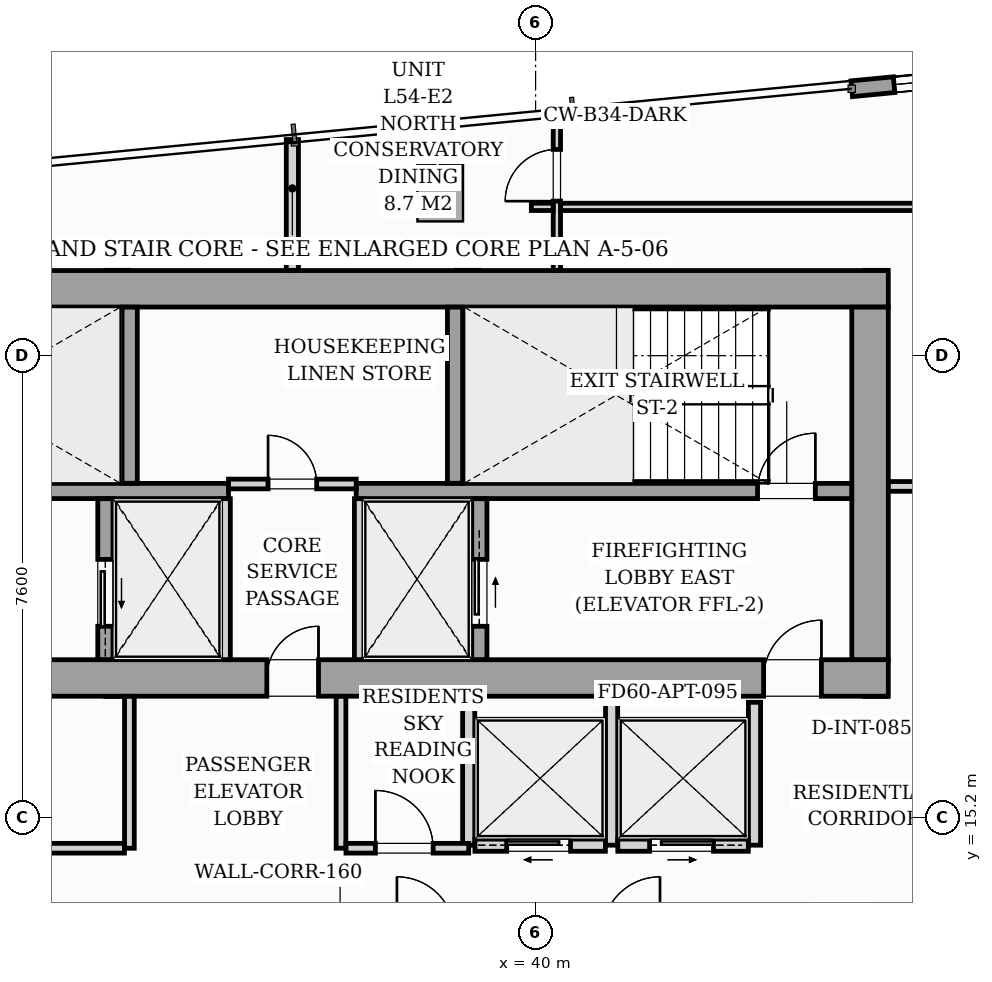
"""IFC4 building model, lengths in metres.
Left out: names, types, materials, properties, quantities, classifications, styles, units other than length and angle.
Written with IfcOpenShell. Run it as: python <this file> out.ifc"""

import sys

from ifc_helpers import new_model, si_unit, direction, frame, frame_2d, origin, origin_2d, place, context, subcontext, project, spatial, rectangle, i_section, extrude, source, transform, mapped, element, fill, save


model = new_model("IFC4")
c1 = context("Model", 3, precision=1e-05, world=origin(), true_north=direction((0.0, 1.0)))
c2 = subcontext(c1, "Body", "Model", "MODEL_VIEW")
j1 = project(units=[si_unit("LENGTHUNIT", "METRE"), si_unit("PLANEANGLEUNIT", "RADIAN")], contexts=[c1])
p1 = place(None, origin())
s1 = spatial("IfcSite", under=j1, at=p1, CompositionType="ELEMENT")
p2 = place(p1, origin())
s2 = spatial("IfcBuilding", under=s1, at=p2, CompositionType="ELEMENT")
p3 = place(p2, frame((0.0, 0.0, 189.0)))
s3 = spatial("IfcBuildingStorey", under=s2, at=p3, CompositionType="ELEMENT", Elevation=189.0)
m1 = source(origin(), c2, "Body", "SweptSolid", [
    extrude(i_section(OverallWidth=0.416, OverallDepth=0.446, WebThickness=0.039, FlangeThickness=0.063, FilletRadius=0.018, at=origin_2d()), origin(), (0.0, 0.0, 1.0), 3.196),
])
for number, where, z_axis, x_axis in (
    (1, (33.12, 17.4, 0.002), (0.0, 0.0, 1.0), (1.0, 0.0, 0.0)),
    (2, (38.88, 17.4, 0.002), (0.0, 0.0, 1.0), (1.0, 0.0, 0.0)),
    (3, (45.6, 17.4, 0.002), (0.0, 0.0, 1.0), (1.0, 0.0, 0.0)),
    (4, (33.12, 24.0, 0.002), (0.0, 0.0, 1.0), (1.0, 0.0, 0.0)),
    (5, (38.88, 24.0, 0.002), (0.0, 0.0, 1.0), (1.0, 0.0, 0.0)),
    (6, (45.6, 24.0, 0.002), (0.0, 0.0, 1.0), (1.0, 0.0, 0.0)),
):
    element("IfcColumn", number, at=place(p3, frame(where, z_axis=z_axis, x_axis=x_axis)), inside=s3, PredefinedType="PILASTER", context=c2, shape_type="MappedRepresentation", body=[
        mapped(m1, transform((0.0, 0.0, 0.0), scale=1.0)),
    ])
m2 = source(origin(), c2, "Body", "SweptSolid", [
    extrude(rectangle(XDim=0.75, YDim=0.95, at=origin_2d()), origin(), (0.0, 0.0, 1.0), 3.196),
])
p4 = place(p3, frame((38.431, 25.483, 0.002), z_axis=(0.0, 0.0, 1.0), x_axis=(0.995396198367, 0.09584575252, 0.0)))
e7 = element("IfcColumn", 7, at=p4, inside=s3, PredefinedType="COLUMN", context=c2, shape_type="MappedRepresentation", body=[
    mapped(m2, transform((0.0, 0.0, 0.0), scale=1.0)),
])
p5 = place(p3, frame((45.199, 27.19, 0.0), z_axis=(0.0, 0.0, 1.0), x_axis=(0.995397074604, 0.095836652014, 0.0)))
e8 = element("IfcWall", 8, at=p5, inside=s3, PredefinedType="STANDARD", context=c2, shape_type="SweptSolid", body=[
    extrude(rectangle(XDim=16.1, YDim=0.26, at=frame_2d((8.05, 0.0))), origin(), (0.0, 0.0, 1.0), 2.94),
])
p6 = place(p5, frame((8.4, 0.0, 0.0)))
e9 = element("IfcOpeningElement", 9, at=p6, cuts=e8, PredefinedType="OPENING", context=c2, shape_type="SweptSolid", body=[
    extrude(rectangle(XDim=1.8, YDim=2.06, at=frame_2d((0.9, 1.03))), frame((0.0, 0.14, 0.0), z_axis=(0.0, -1.0, 0.0), x_axis=(1.0, 0.0, 0.0)), (0.0, 0.0, 1.0), 0.28),
])
p7 = place(p5, frame((0.7, 0.0, 0.65)))
e10 = element("IfcOpeningElement", 10, at=p7, cuts=e8, PredefinedType="OPENING", context=c2, shape_type="SweptSolid", body=[
    extrude(rectangle(XDim=1.6, YDim=1.5, at=frame_2d((0.8, 0.75))), frame((0.0, 0.14, 0.0), z_axis=(0.0, -1.0, 0.0), x_axis=(1.0, 0.0, 0.0)), (0.0, 0.0, 1.0), 0.28),
])
p8 = place(p3, frame((26.2, 17.5, 0.0), z_axis=(0.0, 0.0, 1.0), x_axis=(1.0, 0.0, 0.0)))
e11 = element("IfcWall", 11, at=p8, inside=s3, PredefinedType="SHEAR", context=c2, shape_type="SweptSolid", body=[
    extrude(rectangle(XDim=19.6, YDim=0.6, at=frame_2d((9.8, 0.0))), origin(), (0.0, 0.0, 1.0), 3.2),
])
p9 = place(p8, frame((0.95, 0.0, 0.0)))
e12 = element("IfcOpeningElement", 12, at=p9, cuts=e11, PredefinedType="OPENING", context=c2, shape_type="SweptSolid", body=[
    extrude(rectangle(XDim=0.95, YDim=2.06, at=frame_2d((0.475, 1.03))), frame((0.0, 0.31, 0.0), z_axis=(0.0, -1.0, 0.0), x_axis=(1.0, 0.0, 0.0)), (0.0, 0.0, 1.0), 0.62),
])
p10 = place(p8, frame((9.38, 0.0, 0.0)))
e13 = element("IfcOpeningElement", 13, at=p10, cuts=e11, PredefinedType="OPENING", context=c2, shape_type="SweptSolid", body=[
    extrude(rectangle(XDim=0.85, YDim=2.0, at=frame_2d((0.425, 1.0))), frame((0.0, 0.31, 0.0), z_axis=(0.0, -1.0, 0.0), x_axis=(1.0, 0.0, 0.0)), (0.0, 0.0, 1.0), 0.62),
])
p11 = place(p8, frame((17.55, 0.0, 0.0)))
e14 = element("IfcOpeningElement", 14, at=p11, cuts=e11, PredefinedType="OPENING", context=c2, shape_type="SweptSolid", body=[
    extrude(rectangle(XDim=0.95, YDim=2.06, at=frame_2d((0.475, 1.03))), frame((0.0, 0.31, 0.0), z_axis=(0.0, -1.0, 0.0), x_axis=(1.0, 0.0, 0.0)), (0.0, 0.0, 1.0), 0.62),
])
p12 = place(p3, frame((26.2, 23.9, 0.0), z_axis=(0.0, 0.0, 1.0), x_axis=(1.0, 0.0, 0.0)))
e15 = element("IfcWall", 15, at=p12, inside=s3, PredefinedType="SHEAR", context=c2, shape_type="SweptSolid", body=[
    extrude(rectangle(XDim=19.6, YDim=0.6, at=frame_2d((9.8, 0.0))), origin(), (0.0, 0.0, 1.0), 3.2),
])
p13 = place(p3, frame((45.5, 17.802, 0.0), z_axis=(0.0, 0.0, 1.0), x_axis=(0.0, 1.0, 0.0)))
e16 = element("IfcWall", 16, at=p13, inside=s3, PredefinedType="SHEAR", context=c2, shape_type="SweptSolid", body=[
    extrude(rectangle(XDim=5.796, YDim=0.6, at=frame_2d((2.898, 0.0))), origin(), (0.0, 0.0, 1.0), 3.2),
])
p14 = place(p3, frame((26.802, 20.575, 0.0), z_axis=(0.0, 0.0, 1.0), x_axis=(1.0, 0.0, 0.0)))
e17 = element("IfcWall", 17, at=p14, inside=s3, PredefinedType="SOLIDWALL", context=c2, shape_type="SweptSolid", body=[
    extrude(rectangle(XDim=8.148, YDim=0.25, at=frame_2d((4.074, 0.0))), origin(), (0.0, 0.0, 1.0), 3.2),
])
p15 = place(p14, frame((0.298, 0.0, 0.0)))
e18 = element("IfcOpeningElement", 18, at=p15, cuts=e17, PredefinedType="OPENING", context=c2, shape_type="SweptSolid", body=[
    extrude(rectangle(XDim=0.95, YDim=2.06, at=frame_2d((0.475, 1.03))), frame((0.0, 0.135, 0.0), z_axis=(0.0, -1.0, 0.0), x_axis=(1.0, 0.0, 0.0)), (0.0, 0.0, 1.0), 0.27),
])
p16 = place(p3, frame((37.05, 20.575, 0.0), z_axis=(0.0, 0.0, 1.0), x_axis=(1.0, 0.0, 0.0)))
e19 = element("IfcWall", 19, at=p16, inside=s3, PredefinedType="SOLIDWALL", context=c2, shape_type="SweptSolid", body=[
    extrude(rectangle(XDim=8.148, YDim=0.25, at=frame_2d((4.074, 0.0))), origin(), (0.0, 0.0, 1.0), 3.2),
])
p17 = place(p16, frame((6.6, 0.0, 0.0)))
e20 = element("IfcOpeningElement", 20, at=p17, cuts=e19, PredefinedType="OPENING", context=c2, shape_type="SweptSolid", body=[
    extrude(rectangle(XDim=0.95, YDim=2.06, at=frame_2d((0.475, 1.03))), frame((0.0, 0.135, 0.0), z_axis=(0.0, -1.0, 0.0), x_axis=(1.0, 0.0, 0.0)), (0.0, 0.0, 1.0), 0.27),
])
for number, where, z_axis, x_axis in (
    (21, (33.325, 20.702, 0.0), (0.0, 0.0, 1.0), (0.0, 1.0, 0.0)),
    (22, (38.675, 20.702, 0.0), (0.0, 0.0, 1.0), (0.0, 1.0, 0.0)),
):
    element("IfcWall", number, at=place(p3, frame(where, z_axis=z_axis, x_axis=x_axis)), inside=s3, PredefinedType="SOLIDWALL", context=c2, shape_type="SweptSolid", body=[
        extrude(rectangle(XDim=2.896, YDim=0.25, at=frame_2d((1.448, 0.0))), origin(), (0.0, 0.0, 1.0), 3.2),
    ])
p18 = place(p3, frame((32.925, 17.802, 0.0), z_axis=(0.0, 0.0, 1.0), x_axis=(0.0, 1.0, 0.0)))
e23 = element("IfcWall", 23, at=p18, inside=s3, PredefinedType="SOLIDWALL", context=c2, shape_type="SweptSolid", body=[
    extrude(rectangle(XDim=2.646, YDim=0.25, at=frame_2d((1.323, 0.0))), origin(), (0.0, 0.0, 1.0), 3.2),
])
p19 = place(p18, frame((0.548, 0.0, 0.0)))
e24 = element("IfcOpeningElement", 24, at=p19, cuts=e23, PredefinedType="OPENING", context=c2, shape_type="SweptSolid", body=[
    extrude(rectangle(XDim=1.1, YDim=2.08, at=frame_2d((0.55, 1.04))), frame((0.0, 0.135, 0.0), z_axis=(0.0, -1.0, 0.0), x_axis=(1.0, 0.0, 0.0)), (0.0, 0.0, 1.0), 0.27),
])
for number, where, z_axis, x_axis in (
    (25, (34.9, 17.802, 0.0), (0.0, 0.0, 1.0), (0.0, 1.0, 0.0)),
    (26, (37.1, 17.802, 0.0), (0.0, 0.0, 1.0), (0.0, 1.0, 0.0)),
):
    element("IfcWall", number, at=place(p3, frame(where, z_axis=z_axis, x_axis=x_axis)), inside=s3, PredefinedType="PARTITIONING", context=c2, shape_type="SweptSolid", body=[
        extrude(rectangle(XDim=2.646, YDim=0.16, at=frame_2d((1.323, 0.0))), origin(), (0.0, 0.0, 1.0), 2.94),
    ])
p20 = place(p3, frame((39.075, 17.802, 0.0), z_axis=(0.0, 0.0, 1.0), x_axis=(0.0, 1.0, 0.0)))
e27 = element("IfcWall", 27, at=p20, inside=s3, PredefinedType="SOLIDWALL", context=c2, shape_type="SweptSolid", body=[
    extrude(rectangle(XDim=2.646, YDim=0.25, at=frame_2d((1.323, 0.0))), origin(), (0.0, 0.0, 1.0), 3.2),
])
p21 = place(p20, frame((0.548, 0.0, 0.0)))
e28 = element("IfcOpeningElement", 28, at=p21, cuts=e27, PredefinedType="OPENING", context=c2, shape_type="SweptSolid", body=[
    extrude(rectangle(XDim=1.1, YDim=2.08, at=frame_2d((0.55, 1.04))), frame((0.0, 0.135, 0.0), z_axis=(0.0, -1.0, 0.0), x_axis=(1.0, 0.0, 0.0)), (0.0, 0.0, 1.0), 0.27),
])
p22 = place(p3, frame((34.95, 20.69, 0.0), z_axis=(0.0, 0.0, 1.0), x_axis=(1.0, 0.0, 0.0)))
e29 = element("IfcWall", 29, at=p22, inside=s3, PredefinedType="PARTITIONING", context=c2, shape_type="SweptSolid", body=[
    extrude(rectangle(XDim=2.1, YDim=0.16, at=frame_2d((1.05, 0.0))), origin(), (0.0, 0.0, 1.0), 2.94),
])
p23 = place(p22, frame((0.65, 0.0, 0.0)))
e30 = element("IfcOpeningElement", 30, at=p23, cuts=e29, PredefinedType="OPENING", context=c2, shape_type="SweptSolid", body=[
    extrude(rectangle(XDim=0.8, YDim=2.05, at=frame_2d((0.4, 1.025))), frame((0.0, 0.09, 0.0), z_axis=(0.0, -1.0, 0.0), x_axis=(1.0, 0.0, 0.0)), (0.0, 0.0, 1.0), 0.18),
])
for number, where, z_axis, x_axis in (
    (31, (38.9, 14.75, 0.0), (0.0, 0.0, 1.0), (0.0, 1.0, 0.0)),
    (32, (41.25, 14.75, 0.0), (0.0, 0.0, 1.0), (0.0, 1.0, 0.0)),
    (33, (43.6, 14.75, 0.0), (0.0, 0.0, 1.0), (0.0, 1.0, 0.0)),
):
    element("IfcWall", number, at=place(p3, frame(where, z_axis=z_axis, x_axis=x_axis)), inside=s3, PredefinedType="PARTITIONING", context=c2, shape_type="SweptSolid", body=[
        extrude(rectangle(XDim=2.35, YDim=0.2, at=frame_2d((1.175, 0.0))), origin(), (0.0, 0.0, 1.0), 2.94),
    ])
p24 = place(p3, frame((39.002, 14.75, 0.0), z_axis=(0.0, 0.0, 1.0), x_axis=(1.0, 0.0, 0.0)))
e34 = element("IfcWall", 34, at=p24, inside=s3, PredefinedType="PARTITIONING", context=c2, shape_type="SweptSolid", body=[
    extrude(rectangle(XDim=2.146, YDim=0.2, at=frame_2d((1.073, 0.0))), origin(), (0.0, 0.0, 1.0), 2.94),
])
p25 = place(p24, frame((0.523, 0.0, 0.0)))
e35 = element("IfcOpeningElement", 35, at=p25, cuts=e34, PredefinedType="OPENING", context=c2, shape_type="SweptSolid", body=[
    extrude(rectangle(XDim=1.05, YDim=2.08, at=frame_2d((0.525, 1.04))), frame((0.0, 0.11, 0.0), z_axis=(0.0, -1.0, 0.0), x_axis=(1.0, 0.0, 0.0)), (0.0, 0.0, 1.0), 0.22),
])
p26 = place(p3, frame((41.352, 14.75, 0.0), z_axis=(0.0, 0.0, 1.0), x_axis=(1.0, 0.0, 0.0)))
e36 = element("IfcWall", 36, at=p26, inside=s3, PredefinedType="PARTITIONING", context=c2, shape_type="SweptSolid", body=[
    extrude(rectangle(XDim=2.146, YDim=0.2, at=frame_2d((1.073, 0.0))), origin(), (0.0, 0.0, 1.0), 2.94),
])
p27 = place(p26, frame((0.523, 0.0, 0.0)))
e37 = element("IfcOpeningElement", 37, at=p27, cuts=e36, PredefinedType="OPENING", context=c2, shape_type="SweptSolid", body=[
    extrude(rectangle(XDim=1.05, YDim=2.08, at=frame_2d((0.525, 1.04))), frame((0.0, 0.11, 0.0), z_axis=(0.0, -1.0, 0.0), x_axis=(1.0, 0.0, 0.0)), (0.0, 0.0, 1.0), 0.22),
])
p28 = place(p3, frame((36.0, 24.202, 0.0), z_axis=(0.0, 0.0, 1.0), x_axis=(0.0, 1.0, 0.0)))
e38 = element("IfcWall", 38, at=p28, inside=s3, PredefinedType="PARTITIONING", context=c2, shape_type="SweptSolid", body=[
    extrude(rectangle(XDim=2.152, YDim=0.2, at=frame_2d((1.076, 0.0))), origin(), (0.0, 0.0, 1.0), 2.94),
])
p29 = place(p3, frame((45.802, 20.65, 0.0), z_axis=(0.0, 0.0, 1.0), x_axis=(1.0, 0.0, 0.0)))
e39 = element("IfcWall", 39, at=p29, inside=s3, PredefinedType="PARTITIONING", context=c2, shape_type="SweptSolid", body=[
    extrude(rectangle(XDim=1.566, YDim=0.16, at=frame_2d((0.783, 0.0))), origin(), (0.0, 0.0, 1.0), 2.94),
])
p30 = place(p3, frame((40.35, 24.202, 0.0), z_axis=(0.0, 0.0, 1.0), x_axis=(0.0, 1.0, 0.0)))
e40 = element("IfcWall", 40, at=p30, inside=s3, PredefinedType="PARTITIONING", context=c2, shape_type="SweptSolid", body=[
    extrude(rectangle(XDim=2.571, YDim=0.12, at=frame_2d((1.286, 0.0))), origin(), (0.0, 0.0, 1.0), 2.94),
])
p31 = place(p30, frame((1.14, 0.0, 0.0)))
e41 = element("IfcOpeningElement", 41, at=p31, cuts=e40, PredefinedType="OPENING", context=c2, shape_type="SweptSolid", body=[
    extrude(rectangle(XDim=0.85, YDim=2.05, at=frame_2d((0.425, 1.025))), frame((0.0, 0.07, 0.0), z_axis=(0.0, -1.0, 0.0), x_axis=(1.0, 0.0, 0.0)), (0.0, 0.0, 1.0), 0.14),
])
p32 = place(p3, frame((39.93, 25.247, 0.0), z_axis=(0.0, 0.0, 1.0), x_axis=(1.0, 0.0, 0.0)))
e42 = element("IfcWall", 42, at=p32, inside=s3, PredefinedType="PARTITIONING", context=c2, shape_type="SweptSolid", body=[
    extrude(rectangle(XDim=0.358, YDim=0.12, at=frame_2d((0.179, 0.0))), origin(), (0.0, 0.0, 1.0), 2.94),
])
p33 = place(p3, frame((40.412, 25.247, 0.0), z_axis=(0.0, 0.0, 1.0), x_axis=(1.0, 0.0, 0.0)))
e43 = element("IfcWall", 43, at=p33, inside=s3, PredefinedType="PARTITIONING", context=c2, shape_type="SweptSolid", body=[
    extrude(rectangle(XDim=11.744, YDim=0.12, at=frame_2d((5.872, 0.0))), origin(), (0.0, 0.0, 1.0), 2.94),
])
p34 = place(p33, frame((6.1, 0.0, 0.0)))
e44 = element("IfcOpeningElement", 44, at=p34, cuts=e43, PredefinedType="OPENING", context=c2, shape_type="SweptSolid", body=[
    extrude(rectangle(XDim=0.85, YDim=2.05, at=frame_2d((0.425, 1.025))), frame((0.0, 0.07, 0.0), z_axis=(0.0, -1.0, 0.0), x_axis=(1.0, 0.0, 0.0)), (0.0, 0.0, 1.0), 0.14),
])
p35 = place(p3, frame((33.32, 14.7, 0.0), z_axis=(0.0, 0.0, 1.0), x_axis=(0.0, 1.0, 0.0)))
e45 = element("IfcWall", 45, at=p35, inside=s3, PredefinedType="PARTITIONING", context=c2, shape_type="SweptSolid", body=[
    extrude(rectangle(XDim=2.498, YDim=0.16, at=frame_2d((1.249, 0.0))), origin(), (0.0, 0.0, 1.0), 2.94),
])
p36 = place(p3, frame((28.442, 14.7, 0.0), z_axis=(0.0, 0.0, 1.0), x_axis=(1.0, 0.0, 0.0)))
e46 = element("IfcWall", 46, at=p36, inside=s3, PredefinedType="PARTITIONING", context=c2, shape_type="SweptSolid", body=[
    extrude(rectangle(XDim=4.796, YDim=0.16, at=frame_2d((2.398, 0.0))), origin(), (0.0, 0.0, 1.0), 2.94),
])
p37 = place(p36, frame((1.923, 0.0, 0.0)))
e47 = element("IfcOpeningElement", 47, at=p37, cuts=e46, PredefinedType="OPENING", context=c2, shape_type="SweptSolid", body=[
    extrude(rectangle(XDim=0.95, YDim=2.06, at=frame_2d((0.475, 1.03))), frame((0.0, 0.09, 0.0), z_axis=(0.0, -1.0, 0.0), x_axis=(1.0, 0.0, 0.0)), (0.0, 0.0, 1.0), 0.18),
])
p38 = place(p3, frame((36.8, 14.7, 0.0), z_axis=(0.0, 0.0, 1.0), x_axis=(0.0, 1.0, 0.0)))
e48 = element("IfcWall", 48, at=p38, inside=s3, PredefinedType="PARTITIONING", context=c2, shape_type="SweptSolid", body=[
    extrude(rectangle(XDim=2.498, YDim=0.16, at=frame_2d((1.249, 0.0))), origin(), (0.0, 0.0, 1.0), 2.94),
])
p39 = place(p3, frame((36.882, 14.7, 0.0), z_axis=(0.0, 0.0, 1.0), x_axis=(1.0, 0.0, 0.0)))
e49 = element("IfcWall", 49, at=p39, inside=s3, PredefinedType="PARTITIONING", context=c2, shape_type="SweptSolid", body=[
    extrude(rectangle(XDim=2.018, YDim=0.16, at=frame_2d((1.009, 0.0))), origin(), (0.0, 0.0, 1.0), 2.94),
])
p40 = place(p39, frame((0.483, 0.0, 0.0)))
e50 = element("IfcOpeningElement", 50, at=p40, cuts=e49, PredefinedType="OPENING", context=c2, shape_type="SweptSolid", body=[
    extrude(rectangle(XDim=0.95, YDim=2.06, at=frame_2d((0.475, 1.03))), frame((0.0, 0.09, 0.0), z_axis=(0.0, -1.0, 0.0), x_axis=(1.0, 0.0, 0.0)), (0.0, 0.0, 1.0), 0.18),
])
p41 = place(p3, frame((38.395, 25.861, 0.0), z_axis=(0.0, 0.0, 1.0), x_axis=(-0.095977354523, 0.995383517755, 0.0)))
e51 = element("IfcWall", 51, at=p41, inside=s3, PredefinedType="PARTITIONING", context=c2, shape_type="SweptSolid", body=[
    extrude(rectangle(XDim=0.72, YDim=0.12, at=frame_2d((0.36, 0.0))), origin(), (0.0, 0.0, 1.0), 2.94),
])
m3 = source(origin(), c2, "Body", "SweptSolid", [
    extrude(rectangle(XDim=1.6, YDim=1.5, at=frame_2d((0.8, 0.75))), frame((0.0, 0.03, 0.0), z_axis=(0.0, -1.0, 0.0), x_axis=(1.0, 0.0, 0.0)), (0.0, 0.0, 1.0), 0.06),
])
p42 = place(p7, origin())
e52 = element("IfcWindow", 52, at=p42, inside=s3, PartitioningType="SINGLE_PANEL", PredefinedType="WINDOW", context=c2, shape_type="MappedRepresentation", body=[
    mapped(m3, transform((0.0, 0.0, 0.0), scale=1.0)),
])
fill(e10, e52)
m4 = source(origin(), c2, "Body", "SweptSolid", [
    extrude(rectangle(XDim=0.85, YDim=2.0, at=frame_2d((0.425, 1.0))), frame((0.0, 0.025, 0.0), z_axis=(0.0, -1.0, 0.0), x_axis=(1.0, 0.0, 0.0)), (0.0, 0.0, 1.0), 0.05),
])
p43 = place(p10, origin())
e53 = element("IfcDoor", 53, at=p43, inside=s3, OperationType="SINGLE_SWING_RIGHT", PredefinedType="DOOR", context=c2, shape_type="MappedRepresentation", body=[
    mapped(m4, transform((0.0, 0.0, 0.0), scale=1.0)),
])
fill(e13, e53)
m5 = source(origin(), c2, "Body", "SweptSolid", [
    extrude(rectangle(XDim=0.95, YDim=2.06, at=frame_2d((0.475, 1.03))), frame((0.0, 0.025, 0.0), z_axis=(0.0, -1.0, 0.0), x_axis=(1.0, 0.0, 0.0)), (0.0, 0.0, 1.0), 0.05),
])
p44 = place(p11, origin())
e54 = element("IfcDoor", 54, at=p44, inside=s3, OperationType="SINGLE_SWING_RIGHT", PredefinedType="DOOR", context=c2, shape_type="MappedRepresentation", body=[
    mapped(m5, transform((0.0, 0.0, 0.0), scale=1.0)),
])
fill(e14, e54)
p45 = place(p17, origin())
e55 = element("IfcDoor", 55, at=p45, inside=s3, OperationType="SINGLE_SWING_RIGHT", PredefinedType="DOOR", context=c2, shape_type="MappedRepresentation", body=[
    mapped(m5, transform((0.0, 0.0, 0.0), scale=1.0)),
])
fill(e20, e55)
m6 = source(origin(), c2, "Body", "SweptSolid", [
    extrude(rectangle(XDim=1.1, YDim=2.08, at=frame_2d((0.55, 1.04))), frame((0.0, 0.025, 0.0), z_axis=(0.0, -1.0, 0.0), x_axis=(1.0, 0.0, 0.0)), (0.0, 0.0, 1.0), 0.05),
])
p46 = place(p19, origin())
e56 = element("IfcDoor", 56, at=p46, inside=s3, OperationType="SLIDING_TO_LEFT", PredefinedType="DOOR", context=c2, shape_type="MappedRepresentation", body=[
    mapped(m6, transform((0.0, 0.0, 0.0), scale=1.0)),
])
fill(e24, e56)
p47 = place(p21, origin())
e57 = element("IfcDoor", 57, at=p47, inside=s3, OperationType="SLIDING_TO_RIGHT", PredefinedType="DOOR", context=c2, shape_type="MappedRepresentation", body=[
    mapped(m6, transform((0.0, 0.0, 0.0), scale=1.0)),
])
fill(e28, e57)
m7 = source(origin(), c2, "Body", "SweptSolid", [
    extrude(rectangle(XDim=0.8, YDim=2.05, at=frame_2d((0.4, 1.025))), frame((0.0, 0.025, 0.0), z_axis=(0.0, -1.0, 0.0), x_axis=(1.0, 0.0, 0.0)), (0.0, 0.0, 1.0), 0.05),
])
p48 = place(p23, origin())
e58 = element("IfcDoor", 58, at=p48, inside=s3, OperationType="SINGLE_SWING_LEFT", PredefinedType="DOOR", context=c2, shape_type="MappedRepresentation", body=[
    mapped(m7, transform((0.0, 0.0, 0.0), scale=1.0)),
])
fill(e30, e58)
m8 = source(origin(), c2, "Body", "SweptSolid", [
    extrude(rectangle(XDim=1.05, YDim=2.08, at=frame_2d((0.525, 1.04))), frame((0.0, 0.025, 0.0), z_axis=(0.0, -1.0, 0.0), x_axis=(1.0, 0.0, 0.0)), (0.0, 0.0, 1.0), 0.05),
])
p49 = place(p25, origin())
e59 = element("IfcDoor", 59, at=p49, inside=s3, OperationType="SLIDING_TO_LEFT", PredefinedType="DOOR", context=c2, shape_type="MappedRepresentation", body=[
    mapped(m8, transform((0.0, 0.0, 0.0), scale=1.0)),
])
fill(e35, e59)
p50 = place(p27, origin())
e60 = element("IfcDoor", 60, at=p50, inside=s3, OperationType="SLIDING_TO_RIGHT", PredefinedType="DOOR", context=c2, shape_type="MappedRepresentation", body=[
    mapped(m8, transform((0.0, 0.0, 0.0), scale=1.0)),
])
fill(e37, e60)
m9 = source(origin(), c2, "Body", "SweptSolid", [
    extrude(rectangle(XDim=0.85, YDim=2.05, at=frame_2d((0.425, 1.025))), frame((0.0, 0.025, 0.0), z_axis=(0.0, -1.0, 0.0), x_axis=(1.0, 0.0, 0.0)), (0.0, 0.0, 1.0), 0.05),
])
p51 = place(p31, origin())
e61 = element("IfcDoor", 61, at=p51, inside=s3, OperationType="SINGLE_SWING_LEFT", PredefinedType="DOOR", context=c2, shape_type="MappedRepresentation", body=[
    mapped(m9, transform((0.0, 0.0, 0.0), scale=1.0)),
])
fill(e41, e61)
m10 = source(origin(), c2, "Body", "SweptSolid", [
    extrude(rectangle(XDim=0.95, YDim=2.06, at=frame_2d((0.475, 1.03))), frame((0.0, 0.025, 0.0), z_axis=(0.0, -1.0, 0.0), x_axis=(1.0, 0.0, 0.0)), (0.0, 0.0, 1.0), 0.05),
])
p52 = place(p40, origin())
e62 = element("IfcDoor", 62, at=p52, inside=s3, OperationType="SINGLE_SWING_LEFT", PredefinedType="DOOR", context=c2, shape_type="MappedRepresentation", body=[
    mapped(m10, transform((0.0, 0.0, 0.0), scale=1.0)),
])
fill(e50, e62)
save(model, sys.argv[1])
